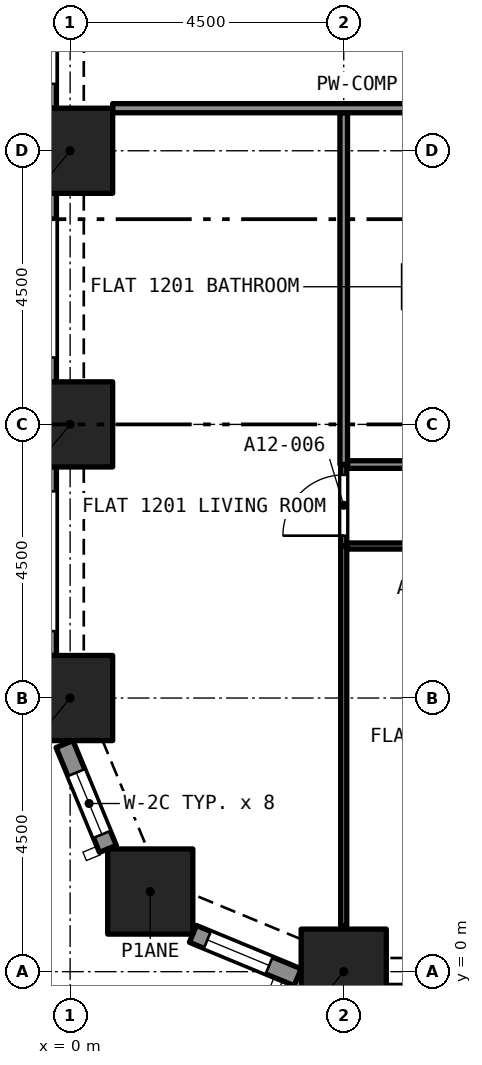
"""IFC4 building model, lengths in metres.
Left out: names, types, materials, properties, quantities, classifications, styles, units other than length and angle.
Written with IfcOpenShell. Run it as: python <this file> out.ifc"""

import sys

from ifc_helpers import new_model, si_unit, direction, frame, frame_2d, origin, origin_2d, place, context, subcontext, project, spatial, rectangle, extrude, element, fill, save


model = new_model("IFC4")
c1 = context("Model", 3, precision=1e-05, world=origin(), true_north=direction((0.0, 1.0)))
c2 = subcontext(c1, "Body", "Model", "MODEL_VIEW")
j1 = project(units=[si_unit("LENGTHUNIT", "METRE"), si_unit("PLANEANGLEUNIT", "RADIAN")], contexts=[c1])
p1 = place(None, origin())
s1 = spatial("IfcSite", under=j1, at=p1, CompositionType="ELEMENT")
p2 = place(p1, origin())
s2 = spatial("IfcBuilding", under=s1, at=p2, CompositionType="ELEMENT")
p3 = place(p2, frame((0.0, 0.0, 49.6)))
s3 = spatial("IfcBuildingStorey", under=s2, at=p3, CompositionType="ELEMENT", Elevation=49.6)
for number, where, z_axis, x_axis in (
    (1, (4.5, 0.0, 0.0), (0.0, 0.0, 1.0), (1.0, 0.0, 0.0)),
    (2, (1.318, 1.318, 0.0), (0.0, 0.0, 1.0), (1.0, 0.0, 0.0)),
    (3, (0.0, 4.5, 0.0), (0.0, 0.0, 1.0), (1.0, 0.0, 0.0)),
    (4, (0.0, 9.0, 0.0), (0.0, 0.0, 1.0), (1.0, 0.0, 0.0)),
    (5, (0.0, 13.5, 0.0), (0.0, 0.0, 1.0), (1.0, 0.0, 0.0)),
):
    element("IfcColumn", number, at=place(p3, frame(where, z_axis=z_axis, x_axis=x_axis)), inside=s3, PredefinedType="COLUMN", context=c2, shape_type="SweptSolid", body=[
        extrude(rectangle(XDim=1.4, YDim=1.4, at=origin_2d()), origin(), (0.0, 0.0, 1.0), 3.2),
    ])
p4 = place(p3, frame((0.622, 2.02, 0.0), z_axis=(0.0, 0.0, 1.0), x_axis=(-0.38262540684, 0.923903565336, 0.0)))
e6 = element("IfcWall", 6, at=p4, inside=s3, PredefinedType="SOLIDWALL", context=c2, shape_type="SweptSolid", body=[
    extrude(rectangle(XDim=1.865, YDim=0.3, at=frame_2d((0.933, 0.0))), origin(), (0.0, 0.0, 1.0), 3.2),
])
p5 = place(p4, frame((0.258, 0.0, 0.45)))
e7 = element("IfcOpeningElement", 7, at=p5, cuts=e6, PredefinedType="OPENING", context=c2, shape_type="SweptSolid", body=[
    extrude(rectangle(XDim=1.1, YDim=1.95, at=frame_2d((0.55, 0.975))), frame((0.0, 0.16, 0.0), z_axis=(0.0, -1.0, 0.0), x_axis=(1.0, 0.0, 0.0)), (0.0, 0.0, 1.0), 0.32),
])
p6 = place(p3, frame((3.743, -0.092, 0.0), z_axis=(0.0, 0.0, 1.0), x_axis=(-0.923857286003, 0.382737135771, 0.0)))
e8 = element("IfcWall", 8, at=p6, inside=s3, PredefinedType="SOLIDWALL", context=c2, shape_type="SweptSolid", body=[
    extrude(rectangle(XDim=1.865, YDim=0.3, at=frame_2d((0.933, 0.0))), origin(), (0.0, 0.0, 1.0), 3.2),
])
p7 = place(p6, frame((0.508, 0.0, 0.45)))
e9 = element("IfcOpeningElement", 9, at=p7, cuts=e8, PredefinedType="OPENING", context=c2, shape_type="SweptSolid", body=[
    extrude(rectangle(XDim=1.1, YDim=1.95, at=frame_2d((0.55, 0.975))), frame((0.0, 0.16, 0.0), z_axis=(0.0, -1.0, 0.0), x_axis=(1.0, 0.0, 0.0)), (0.0, 0.0, 1.0), 0.32),
])
p8 = place(p3, frame((-0.375, 14.2, 0.0), z_axis=(0.0, 0.0, 1.0), x_axis=(0.0, 1.0, 0.0)))
e10 = element("IfcWall", 10, at=p8, inside=s3, PredefinedType="SOLIDWALL", context=c2, shape_type="SweptSolid", body=[
    extrude(rectangle(XDim=3.1, YDim=0.3, at=frame_2d((1.55, 0.0))), origin(), (0.0, 0.0, 1.0), 3.2),
])
p9 = place(p8, frame((0.4, 0.0, 0.45)))
e11 = element("IfcOpeningElement", 11, at=p9, cuts=e10, PredefinedType="OPENING", context=c2, shape_type="SweptSolid", body=[
    extrude(rectangle(XDim=2.3, YDim=1.95, at=frame_2d((1.15, 0.975))), frame((0.0, 0.16, 0.0), z_axis=(0.0, -1.0, 0.0), x_axis=(1.0, 0.0, 0.0)), (0.0, 0.0, 1.0), 0.32),
])
p10 = place(p3, frame((-0.375, 9.7, 0.0), z_axis=(0.0, 0.0, 1.0), x_axis=(0.0, 1.0, 0.0)))
e12 = element("IfcWall", 12, at=p10, inside=s3, PredefinedType="SOLIDWALL", context=c2, shape_type="SweptSolid", body=[
    extrude(rectangle(XDim=3.1, YDim=0.3, at=frame_2d((1.55, 0.0))), origin(), (0.0, 0.0, 1.0), 3.2),
])
p11 = place(p10, frame((0.4, 0.0, 0.45)))
e13 = element("IfcOpeningElement", 13, at=p11, cuts=e12, PredefinedType="OPENING", context=c2, shape_type="SweptSolid", body=[
    extrude(rectangle(XDim=2.3, YDim=1.95, at=frame_2d((1.15, 0.975))), frame((0.0, 0.16, 0.0), z_axis=(0.0, -1.0, 0.0), x_axis=(1.0, 0.0, 0.0)), (0.0, 0.0, 1.0), 0.32),
])
p12 = place(p3, frame((-0.375, 5.2, 0.0), z_axis=(0.0, 0.0, 1.0), x_axis=(0.0, 1.0, 0.0)))
e14 = element("IfcWall", 14, at=p12, inside=s3, PredefinedType="SOLIDWALL", context=c2, shape_type="SweptSolid", body=[
    extrude(rectangle(XDim=3.1, YDim=0.3, at=frame_2d((1.55, 0.0))), origin(), (0.0, 0.0, 1.0), 3.2),
])
p13 = place(p12, frame((0.4, 0.0, 0.45)))
e15 = element("IfcOpeningElement", 15, at=p13, cuts=e14, PredefinedType="OPENING", context=c2, shape_type="SweptSolid", body=[
    extrude(rectangle(XDim=2.3, YDim=1.95, at=frame_2d((1.15, 0.975))), frame((0.0, 0.16, 0.0), z_axis=(0.0, -1.0, 0.0), x_axis=(1.0, 0.0, 0.0)), (0.0, 0.0, 1.0), 0.32),
])
p14 = place(p3, frame((4.562, 8.34, 0.0), z_axis=(0.0, 0.0, 1.0), x_axis=(1.0, 0.0, 0.0)))
e16 = element("IfcWall", 16, at=p14, inside=s3, PredefinedType="PARTITIONING", context=c2, shape_type="SweptSolid", body=[
    extrude(rectangle(XDim=3.536, YDim=0.125, at=frame_2d((1.768, 0.0))), origin(), (0.0, 0.0, 1.0), 2.9),
])
p15 = place(p14, frame((1.337, 0.0, 0.0)))
e17 = element("IfcOpeningElement", 17, at=p15, cuts=e16, PredefinedType="OPENING", context=c2, shape_type="SweptSolid", body=[
    extrude(rectangle(XDim=0.8, YDim=2.1, at=frame_2d((0.4, 1.05))), frame((0.0, 0.073, 0.0), z_axis=(0.0, -1.0, 0.0), x_axis=(1.0, 0.0, 0.0)), (0.0, 0.0, 1.0), 0.145),
])
p16 = place(p3, frame((4.5, 8.34, 0.0), z_axis=(0.0, 0.0, 1.0), x_axis=(0.0, 1.0, 0.0)))
e18 = element("IfcWall", 18, at=p16, inside=s3, PredefinedType="PARTITIONING", context=c2, shape_type="SweptSolid", body=[
    extrude(rectangle(XDim=5.785, YDim=0.125, at=frame_2d((2.893, 0.0))), origin(), (0.0, 0.0, 1.0), 2.9),
])
p17 = place(p3, frame((9.0, 7.0, 0.0), z_axis=(0.0, 0.0, 1.0), x_axis=(-1.0, 0.0, 0.0)))
e19 = element("IfcWall", 19, at=p17, inside=s3, PredefinedType="PARTITIONING", context=c2, shape_type="SweptSolid", body=[
    extrude(rectangle(XDim=4.45, YDim=0.1, at=frame_2d((2.225, 0.0))), origin(), (0.0, 0.0, 1.0), 2.9),
])
p18 = place(p17, frame((1.8, 0.0, 0.0)))
e20 = element("IfcOpeningElement", 20, at=p18, cuts=e19, PredefinedType="OPENING", context=c2, shape_type="SweptSolid", body=[
    extrude(rectangle(XDim=0.9, YDim=2.1, at=frame_2d((0.45, 1.05))), frame((0.0, 0.06, 0.0), z_axis=(0.0, -1.0, 0.0), x_axis=(1.0, 0.0, 0.0)), (0.0, 0.0, 1.0), 0.12),
])
p19 = place(p3, frame((4.5, 0.758, 0.0), z_axis=(0.0, 0.0, 1.0), x_axis=(0.0, 1.0, 0.0)))
e21 = element("IfcWall", 21, at=p19, inside=s3, PredefinedType="PARTITIONING", context=c2, shape_type="SweptSolid", body=[
    extrude(rectangle(XDim=6.242, YDim=0.1, at=frame_2d((3.121, 0.0))), origin(), (0.0, 0.0, 1.0), 2.9),
])
p20 = place(p3, frame((4.5, 7.0, 0.0), z_axis=(0.0, 0.0, 1.0), x_axis=(0.0, 1.0, 0.0)))
e22 = element("IfcWall", 22, at=p20, inside=s3, PredefinedType="PARTITIONING", context=c2, shape_type="SweptSolid", body=[
    extrude(rectangle(XDim=1.34, YDim=0.1, at=frame_2d((0.67, 0.0))), origin(), (0.0, 0.0, 1.0), 2.9),
])
p21 = place(p20, frame((0.17, 0.0, 0.0)))
e23 = element("IfcOpeningElement", 23, at=p21, cuts=e22, PredefinedType="OPENING", context=c2, shape_type="SweptSolid", body=[
    extrude(rectangle(XDim=1.0, YDim=2.1, at=frame_2d((0.5, 1.05))), frame((0.0, 0.06, 0.0), z_axis=(0.0, -1.0, 0.0), x_axis=(1.0, 0.0, 0.0)), (0.0, 0.0, 1.0), 0.12),
])
p22 = place(p3, frame((0.7, 14.2, 0.0), z_axis=(0.0, 0.0, 1.0), x_axis=(1.0, 0.0, 0.0)))
e24 = element("IfcWall", 24, at=p22, inside=s3, PredefinedType="PARTITIONING", context=c2, shape_type="SweptSolid", body=[
    extrude(rectangle(XDim=9.95, YDim=0.15, at=frame_2d((4.975, 0.0))), origin(), (0.0, 0.0, 1.0), 2.9),
])
p23 = place(p5, origin())
e25 = element("IfcWindow", 25, at=p23, inside=s3, PartitioningType="SINGLE_PANEL", PredefinedType="WINDOW", context=c2, shape_type="SweptSolid", body=[
    extrude(rectangle(XDim=1.1, YDim=1.95, at=frame_2d((0.55, 0.975))), frame((0.0, 0.03, 0.0), z_axis=(0.0, -1.0, 0.0), x_axis=(1.0, 0.0, 0.0)), (0.0, 0.0, 1.0), 0.06),
])
fill(e7, e25)
p24 = place(p7, origin())
e26 = element("IfcWindow", 26, at=p24, inside=s3, PartitioningType="SINGLE_PANEL", PredefinedType="WINDOW", context=c2, shape_type="SweptSolid", body=[
    extrude(rectangle(XDim=1.1, YDim=1.95, at=frame_2d((0.55, 0.975))), frame((0.0, 0.03, 0.0), z_axis=(0.0, -1.0, 0.0), x_axis=(1.0, 0.0, 0.0)), (0.0, 0.0, 1.0), 0.06),
])
fill(e9, e26)
p25 = place(p21, origin())
e27 = element("IfcDoor", 27, at=p25, inside=s3, OperationType="SINGLE_SWING_RIGHT", PredefinedType="DOOR", context=c2, shape_type="SweptSolid", body=[
    extrude(rectangle(XDim=1.0, YDim=2.1, at=frame_2d((0.5, 1.05))), frame((0.0, 0.025, 0.0), z_axis=(0.0, -1.0, 0.0), x_axis=(1.0, 0.0, 0.0)), (0.0, 0.0, 1.0), 0.05),
])
fill(e23, e27)
save(model, sys.argv[1])
